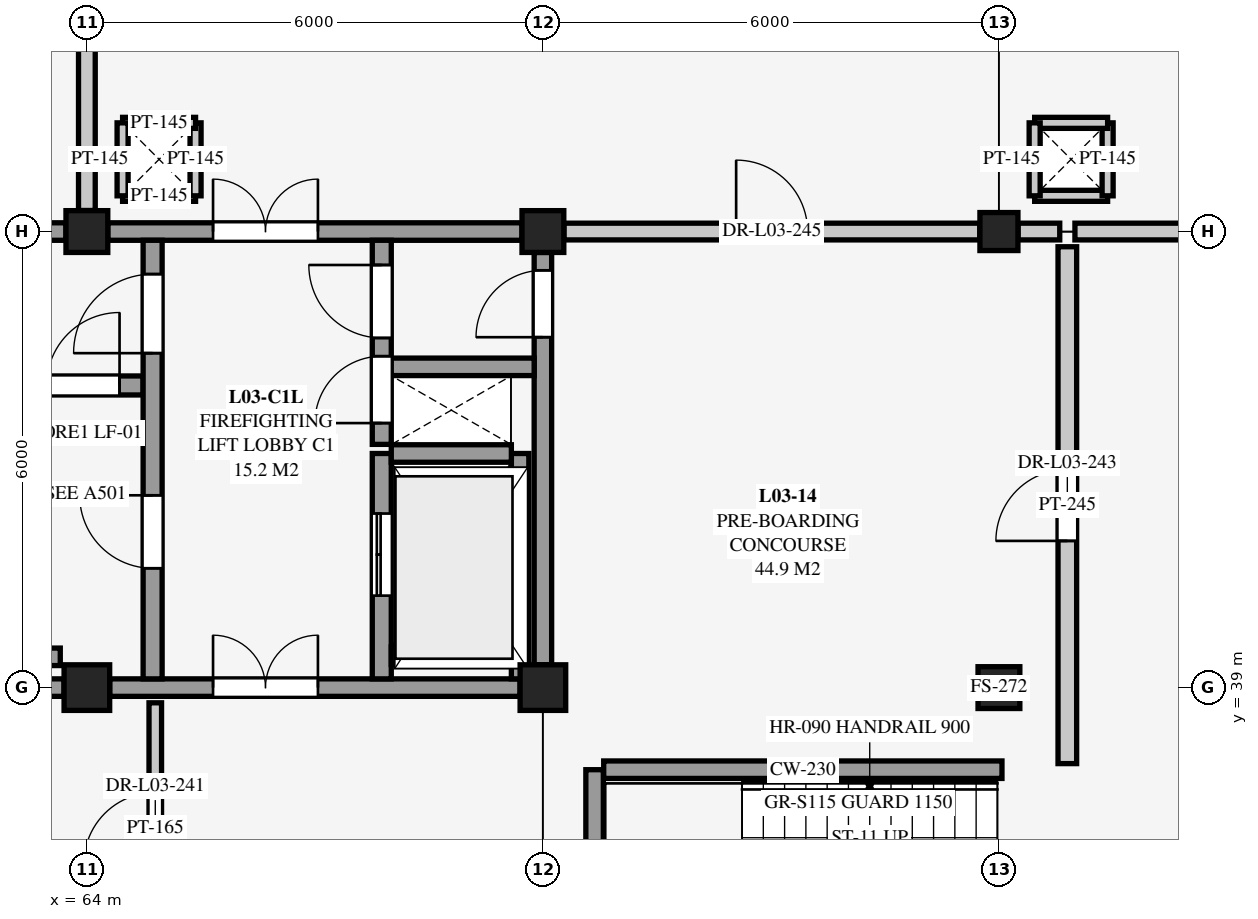
"""IFC4 building model, lengths in metres.
Left out: names, types, materials, properties, quantities, classifications, styles, units other than length and angle.
Written with IfcOpenShell. Run it as: python <this file> out.ifc"""

import sys

from ifc_helpers import new_model, si_unit, direction, frame, frame_2d, origin, origin_2d, place, context, subcontext, project, spatial, rectangle, extrude, element, fill, save


model = new_model("IFC4")
c1 = context("Model", 3, precision=1e-05, world=origin(), true_north=direction((0.0, 1.0)))
c2 = subcontext(c1, "Body", "Model", "MODEL_VIEW")
j1 = project(units=[si_unit("LENGTHUNIT", "METRE"), si_unit("PLANEANGLEUNIT", "RADIAN")], contexts=[c1])
p1 = place(None, origin())
s1 = spatial("IfcSite", under=j1, at=p1, CompositionType="ELEMENT")
p2 = place(p1, origin())
s2 = spatial("IfcBuilding", under=s1, at=p2, CompositionType="ELEMENT")
p3 = place(p2, frame((0.0, 0.0, 9.0)))
s3 = spatial("IfcBuildingStorey", under=s2, at=p3, CompositionType="ELEMENT", Elevation=9.0)
p4 = place(p3, frame((64.0, 39.0, 0.0), z_axis=(0.0, 0.0, 1.0), x_axis=(1.0, 0.0, 0.0)))
e1 = element("IfcColumn", 1, at=p4, inside=s3, PredefinedType="COLUMN", context=c2, shape_type="SweptSolid", body=[
    extrude(rectangle(XDim=0.6, YDim=0.6, at=origin_2d()), origin(), (0.0, 0.0, 1.0), 4.5),
])
p5 = place(p3, frame((64.0, 45.0, 0.0), z_axis=(0.0, 0.0, 1.0), x_axis=(1.0, 0.0, 0.0)))
e2 = element("IfcColumn", 2, at=p5, inside=s3, PredefinedType="COLUMN", context=c2, shape_type="SweptSolid", body=[
    extrude(rectangle(XDim=0.55, YDim=0.55, at=origin_2d()), origin(), (0.0, 0.0, 1.0), 4.5),
])
p6 = place(p3, frame((70.0, 39.0, 0.0), z_axis=(0.0, 0.0, 1.0), x_axis=(1.0, 0.0, 0.0)))
e3 = element("IfcColumn", 3, at=p6, inside=s3, PredefinedType="COLUMN", context=c2, shape_type="SweptSolid", body=[
    extrude(rectangle(XDim=0.6, YDim=0.6, at=origin_2d()), origin(), (0.0, 0.0, 1.0), 4.5),
])
for number, where, z_axis, x_axis in (
    (4, (70.0, 45.0, 0.0), (0.0, 0.0, 1.0), (1.0, 0.0, 0.0)),
    (5, (76.0, 39.0, 0.0), (0.0, 0.0, 1.0), (1.0, 0.0, 0.0)),
):
    element("IfcColumn", number, at=place(p3, frame(where, z_axis=z_axis, x_axis=x_axis)), inside=s3, PredefinedType="COLUMN", context=c2, shape_type="SweptSolid", body=[
        extrude(rectangle(XDim=0.55, YDim=0.55, at=origin_2d()), origin(), (0.0, 0.0, 1.0), 4.5),
    ])
p7 = place(p3, frame((76.0, 45.0, 0.0), z_axis=(0.0, 0.0, 1.0), x_axis=(1.0, 0.0, 0.0)))
e6 = element("IfcColumn", 6, at=p7, inside=s3, PredefinedType="COLUMN", context=c2, shape_type="SweptSolid", body=[
    extrude(rectangle(XDim=0.5, YDim=0.5, at=origin_2d()), origin(), (0.0, 0.0, 1.0), 4.5),
])
for number, where, z_axis, x_axis in (
    (7, (64.47, 45.47, 0.0), (0.0, 0.0, 1.0), (1.0, 0.0, 0.0)),
    (8, (65.43, 45.47, 0.0), (0.0, 0.0, 1.0), (0.0, 1.0, 0.0)),
    (9, (65.43, 46.43, 0.0), (0.0, 0.0, 1.0), (-1.0, 0.0, 0.0)),
    (10, (64.47, 46.43, 0.0), (0.0, 0.0, 1.0), (0.0, -1.0, 0.0)),
    (11, (76.47, 45.47, 0.0), (0.0, 0.0, 1.0), (1.0, 0.0, 0.0)),
    (12, (77.43, 45.47, 0.0), (0.0, 0.0, 1.0), (0.0, 1.0, 0.0)),
    (13, (77.43, 46.43, 0.0), (0.0, 0.0, 1.0), (-1.0, 0.0, 0.0)),
    (14, (76.47, 46.43, 0.0), (0.0, 0.0, 1.0), (0.0, -1.0, 0.0)),
):
    element("IfcWall", number, at=place(p3, frame(where, z_axis=z_axis, x_axis=x_axis)), inside=s3, PredefinedType="PARTITIONING", context=c2, shape_type="SweptSolid", body=[
        extrude(rectangle(XDim=0.96, YDim=0.145, at=frame_2d((0.48, 0.0))), origin(), (0.0, 0.0, 1.0), 4.252),
    ])
p8 = place(p3, frame((58.25, 39.0, 0.0), z_axis=(0.0, 0.0, 1.0), x_axis=(1.0, 0.0, 0.0)))
e15 = element("IfcWall", 15, at=p8, inside=s3, PredefinedType="SHEAR", context=c2, shape_type="SweptSolid", body=[
    extrude(rectangle(XDim=5.45, YDim=0.23, at=frame_2d((2.725, 0.0))), origin(), (0.0, 0.0, 1.0), 4.216),
])
p9 = place(p3, frame((64.3, 39.0, 0.0), z_axis=(0.0, 0.0, 1.0), x_axis=(1.0, 0.0, 0.0)))
e16 = element("IfcWall", 16, at=p9, inside=s3, PredefinedType="SHEAR", context=c2, shape_type="SweptSolid", body=[
    extrude(rectangle(XDim=5.4, YDim=0.23, at=frame_2d((2.7, 0.0))), origin(), (0.0, 0.0, 1.0), 4.216),
])
p10 = place(p9, frame((1.36, 0.0, 0.0)))
e17 = element("IfcOpeningElement", 17, at=p10, cuts=e16, PredefinedType="OPENING", context=c2, shape_type="SweptSolid", body=[
    extrude(rectangle(XDim=1.38, YDim=2.16, at=frame_2d((0.69, 1.08))), frame((0.0, 0.125, 0.0), z_axis=(0.0, -1.0, 0.0), x_axis=(1.0, 0.0, 0.0)), (0.0, 0.0, 1.0), 0.25),
])
p11 = place(p3, frame((58.325, 45.0, 0.0), z_axis=(0.0, 0.0, 1.0), x_axis=(1.0, 0.0, 0.0)))
e18 = element("IfcWall", 18, at=p11, inside=s3, PredefinedType="SHEAR", context=c2, shape_type="SweptSolid", body=[
    extrude(rectangle(XDim=5.4, YDim=0.23, at=frame_2d((2.7, 0.0))), origin(), (0.0, 0.0, 1.0), 4.216),
])
p12 = place(p11, frame((3.605, 0.0, 0.0)))
e19 = element("IfcOpeningElement", 19, at=p12, cuts=e18, PredefinedType="OPENING", context=c2, shape_type="SweptSolid", body=[
    extrude(rectangle(XDim=1.04, YDim=2.14, at=frame_2d((0.52, 1.07))), frame((0.0, 0.125, 0.0), z_axis=(0.0, -1.0, 0.0), x_axis=(1.0, 0.0, 0.0)), (0.0, 0.0, 1.0), 0.25),
])
p13 = place(p3, frame((64.275, 45.0, 0.0), z_axis=(0.0, 0.0, 1.0), x_axis=(1.0, 0.0, 0.0)))
e20 = element("IfcWall", 20, at=p13, inside=s3, PredefinedType="SHEAR", context=c2, shape_type="SweptSolid", body=[
    extrude(rectangle(XDim=5.45, YDim=0.23, at=frame_2d((2.725, 0.0))), origin(), (0.0, 0.0, 1.0), 4.216),
])
p14 = place(p13, frame((1.385, 0.0, 0.0)))
e21 = element("IfcOpeningElement", 21, at=p14, cuts=e20, PredefinedType="OPENING", context=c2, shape_type="SweptSolid", body=[
    extrude(rectangle(XDim=1.38, YDim=2.16, at=frame_2d((0.69, 1.08))), frame((0.0, 0.125, 0.0), z_axis=(0.0, -1.0, 0.0), x_axis=(1.0, 0.0, 0.0)), (0.0, 0.0, 1.0), 0.25),
])
p15 = place(p3, frame((70.0, 39.3, 0.0), z_axis=(0.0, 0.0, 1.0), x_axis=(0.0, 1.0, 0.0)))
e22 = element("IfcWall", 22, at=p15, inside=s3, PredefinedType="SHEAR", context=c2, shape_type="SweptSolid", body=[
    extrude(rectangle(XDim=5.425, YDim=0.23, at=frame_2d((2.712, 0.0))), origin(), (0.0, 0.0, 1.0), 4.216),
])
p16 = place(p15, frame((4.31, 0.0, 0.0)))
e23 = element("IfcOpeningElement", 23, at=p16, cuts=e22, PredefinedType="OPENING", context=c2, shape_type="SweptSolid", body=[
    extrude(rectangle(XDim=0.88, YDim=2.08, at=frame_2d((0.44, 1.04))), frame((0.0, 0.125, 0.0), z_axis=(0.0, -1.0, 0.0), x_axis=(1.0, 0.0, 0.0)), (0.0, 0.0, 1.0), 0.25),
])
p17 = place(p3, frame((58.52, 39.405, 0.0), z_axis=(0.0, 0.0, 1.0), x_axis=(1.0, 0.0, 0.0)))
e24 = element("IfcWall", 24, at=p17, inside=s3, PredefinedType="SHEAR", context=c2, shape_type="SweptSolid", body=[
    extrude(rectangle(XDim=5.13, YDim=0.23, at=frame_2d((2.565, 0.0))), origin(), (0.0, 0.0, 1.0), 4.5),
])
p18 = place(p3, frame((63.16, 42.975, 0.0), z_axis=(0.0, 0.0, 1.0), x_axis=(1.0, 0.0, 0.0)))
e25 = element("IfcWall", 25, at=p18, inside=s3, PredefinedType="SHEAR", context=c2, shape_type="SweptSolid", body=[
    extrude(rectangle(XDim=1.58, YDim=0.25, at=frame_2d((0.79, 0.0))), origin(), (0.0, 0.0, 1.0), 4.216),
])
p19 = place(p18, frame((0.31, 0.0, 0.0)))
e26 = element("IfcOpeningElement", 26, at=p19, cuts=e25, PredefinedType="OPENING", context=c2, shape_type="SweptSolid", body=[
    extrude(rectangle(XDim=0.96, YDim=2.12, at=frame_2d((0.48, 1.06))), frame((0.0, 0.135, 0.0), z_axis=(0.0, -1.0, 0.0), x_axis=(1.0, 0.0, 0.0)), (0.0, 0.0, 1.0), 0.27),
])
p20 = place(p3, frame((64.865, 39.115, 0.0), z_axis=(0.0, 0.0, 1.0), x_axis=(0.0, 1.0, 0.0)))
e27 = element("IfcWall", 27, at=p20, inside=s3, PredefinedType="SHEAR", context=c2, shape_type="SweptSolid", body=[
    extrude(rectangle(XDim=5.77, YDim=0.25, at=frame_2d((2.885, 0.0))), origin(), (0.0, 0.0, 1.0), 4.216),
])
p21 = place(p20, frame((4.285, 0.0, 0.0)))
e28 = element("IfcOpeningElement", 28, at=p21, cuts=e27, PredefinedType="OPENING", context=c2, shape_type="SweptSolid", body=[
    extrude(rectangle(XDim=1.04, YDim=2.14, at=frame_2d((0.52, 1.07))), frame((0.0, 0.135, 0.0), z_axis=(0.0, -1.0, 0.0), x_axis=(1.0, 0.0, 0.0)), (0.0, 0.0, 1.0), 0.27),
])
p22 = place(p20, frame((1.455, 0.0, 0.0)))
e29 = element("IfcOpeningElement", 29, at=p22, cuts=e27, PredefinedType="OPENING", context=c2, shape_type="SweptSolid", body=[
    extrude(rectangle(XDim=0.96, YDim=2.12, at=frame_2d((0.48, 1.06))), frame((0.0, 0.135, 0.0), z_axis=(0.0, -1.0, 0.0), x_axis=(1.0, 0.0, 0.0)), (0.0, 0.0, 1.0), 0.27),
])
p23 = place(p3, frame((67.88, 39.115, 0.0), z_axis=(0.0, 0.0, 1.0), x_axis=(0.0, 1.0, 0.0)))
e30 = element("IfcWall", 30, at=p23, inside=s3, PredefinedType="SHEAR", context=c2, shape_type="SweptSolid", body=[
    extrude(rectangle(XDim=2.965, YDim=0.25, at=frame_2d((1.482, 0.0))), origin(), (0.0, 0.0, 1.0), 4.5),
])
p24 = place(p23, frame((1.095, 0.0, 0.0)))
e31 = element("IfcOpeningElement", 31, at=p24, cuts=e30, PredefinedType="OPENING", context=c2, shape_type="SweptSolid", body=[
    extrude(rectangle(XDim=1.08, YDim=2.15, at=frame_2d((0.54, 1.075))), frame((0.0, 0.135, 0.0), z_axis=(0.0, -1.0, 0.0), x_axis=(1.0, 0.0, 0.0)), (0.0, 0.0, 1.0), 0.27),
])
p25 = place(p3, frame((68.005, 39.42, 0.0), z_axis=(0.0, 0.0, 1.0), x_axis=(1.0, 0.0, 0.0)))
e32 = element("IfcWall", 32, at=p25, inside=s3, PredefinedType="SHEAR", context=c2, shape_type="SweptSolid", body=[
    extrude(rectangle(XDim=1.58, YDim=0.23, at=frame_2d((0.79, 0.0))), origin(), (0.0, 0.0, 1.0), 4.5),
])
p26 = place(p3, frame((69.7, 39.115, 0.0), z_axis=(0.0, 0.0, 1.0), x_axis=(0.0, 1.0, 0.0)))
e33 = element("IfcWall", 33, at=p26, inside=s3, PredefinedType="SHEAR", context=c2, shape_type="SweptSolid", body=[
    extrude(rectangle(XDim=2.965, YDim=0.23, at=frame_2d((1.482, 0.0))), origin(), (0.0, 0.0, 1.0), 4.5),
])
p27 = place(p3, frame((68.005, 42.08, 0.0), z_axis=(0.0, 0.0, 1.0), x_axis=(1.0, 0.0, 0.0)))
e34 = element("IfcWall", 34, at=p27, inside=s3, PredefinedType="SHEAR", context=c2, shape_type="SweptSolid", body=[
    extrude(rectangle(XDim=1.58, YDim=0.23, at=frame_2d((0.79, 0.0))), origin(), (0.0, 0.0, 1.0), 4.5),
])
p28 = place(p3, frame((67.88, 42.2, 0.0), z_axis=(0.0, 0.0, 1.0), x_axis=(0.0, 1.0, 0.0)))
e35 = element("IfcWall", 35, at=p28, inside=s3, PredefinedType="SHEAR", context=c2, shape_type="SweptSolid", body=[
    extrude(rectangle(XDim=2.685, YDim=0.25, at=frame_2d((1.343, 0.0))), origin(), (0.0, 0.0, 1.0), 4.216),
])
p29 = place(p28, frame((0.28, 0.0, 0.0)))
e36 = element("IfcOpeningElement", 36, at=p29, cuts=e35, PredefinedType="OPENING", context=c2, shape_type="SweptSolid", body=[
    extrude(rectangle(XDim=0.88, YDim=2.08, at=frame_2d((0.44, 1.04))), frame((0.0, 0.135, 0.0), z_axis=(0.0, -1.0, 0.0), x_axis=(1.0, 0.0, 0.0)), (0.0, 0.0, 1.0), 0.27),
])
p30 = place(p28, frame((1.4, 0.0, 0.0)))
e37 = element("IfcOpeningElement", 37, at=p30, cuts=e35, PredefinedType="OPENING", context=c2, shape_type="SweptSolid", body=[
    extrude(rectangle(XDim=0.96, YDim=2.12, at=frame_2d((0.48, 1.06))), frame((0.0, 0.135, 0.0), z_axis=(0.0, -1.0, 0.0), x_axis=(1.0, 0.0, 0.0)), (0.0, 0.0, 1.0), 0.27),
])
p31 = place(p3, frame((68.005, 43.22, 0.0), z_axis=(0.0, 0.0, 1.0), x_axis=(1.0, 0.0, 0.0)))
e38 = element("IfcWall", 38, at=p31, inside=s3, PredefinedType="SHEAR", context=c2, shape_type="SweptSolid", body=[
    extrude(rectangle(XDim=1.88, YDim=0.23, at=frame_2d((0.94, 0.0))), origin(), (0.0, 0.0, 1.0), 4.216),
])
p32 = place(p3, frame((70.68, 34.08, 0.0), z_axis=(0.0, 0.0, 1.0), x_axis=(0.0, 1.0, 0.0)))
e39 = element("IfcWall", 39, at=p32, inside=s3, PredefinedType="SHEAR", context=c2, shape_type="SweptSolid", body=[
    extrude(rectangle(XDim=3.84, YDim=0.23, at=frame_2d((1.92, 0.0))), origin(), (0.0, 0.0, 1.0), 4.216),
])
p33 = place(p3, frame((70.8, 37.92, 0.0), z_axis=(0.0, 0.0, 1.0), x_axis=(1.0, 0.0, 0.0)))
e40 = element("IfcWall", 40, at=p33, inside=s3, PredefinedType="SHEAR", context=c2, shape_type="SweptSolid", body=[
    extrude(rectangle(XDim=5.24, YDim=0.23, at=frame_2d((2.62, 0.0))), origin(), (0.0, 0.0, 1.0), 4.216),
])
p34 = place(p3, frame((64.9, 35.5, 0.0), z_axis=(0.0, 0.0, 1.0), x_axis=(0.0, 1.0, 0.0)))
e41 = element("IfcWall", 41, at=p34, inside=s3, PredefinedType="PARTITIONING", context=c2, shape_type="SweptSolid", body=[
    extrude(rectangle(XDim=3.3, YDim=0.165, at=frame_2d((1.65, 0.0))), origin(), (0.0, 0.0, 1.0), 4.24),
])
p35 = place(p34, frame((1.18, 0.0, 0.0)))
e42 = element("IfcOpeningElement", 42, at=p35, cuts=e41, PredefinedType="OPENING", context=c2, shape_type="SweptSolid", body=[
    extrude(rectangle(XDim=0.94, YDim=2.1, at=frame_2d((0.47, 1.05))), frame((0.0, 0.093, 0.0), z_axis=(0.0, -1.0, 0.0), x_axis=(1.0, 0.0, 0.0)), (0.0, 0.0, 1.0), 0.185),
])
p36 = place(p3, frame((76.9, 38.0, 0.0), z_axis=(0.0, 0.0, 1.0), x_axis=(0.0, 1.0, 0.0)))
e43 = element("IfcWall", 43, at=p36, inside=s3, PredefinedType="PARTITIONING", context=c2, shape_type="SweptSolid", body=[
    extrude(rectangle(XDim=6.8, YDim=0.245, at=frame_2d((3.4, 0.0))), origin(), (0.0, 0.0, 1.0), 4.216),
])
p37 = place(p36, frame((2.93, 0.0, 0.0)))
e44 = element("IfcOpeningElement", 44, at=p37, cuts=e43, PredefinedType="OPENING", context=c2, shape_type="SweptSolid", body=[
    extrude(rectangle(XDim=0.94, YDim=2.1, at=frame_2d((0.47, 1.05))), frame((0.0, 0.133, 0.0), z_axis=(0.0, -1.0, 0.0), x_axis=(1.0, 0.0, 0.0)), (0.0, 0.0, 1.0), 0.265),
])
p38 = place(p3, frame((77.0, 45.0, 0.0), z_axis=(0.0, 0.0, 1.0), x_axis=(1.0, 0.0, 0.0)))
e45 = element("IfcWall", 45, at=p38, inside=s3, PredefinedType="SOLIDWALL", context=c2, shape_type="SweptSolid", body=[
    extrude(rectangle(XDim=4.698, YDim=0.22, at=frame_2d((2.349, 0.0))), origin(), (0.0, 0.0, 1.0), 3.753),
])
p39 = place(p38, frame((1.879, 0.0, 0.0)))
e46 = element("IfcOpeningElement", 46, at=p39, cuts=e45, PredefinedType="OPENING", context=c2, shape_type="SweptSolid", body=[
    extrude(rectangle(XDim=0.94, YDim=2.1, at=frame_2d((0.47, 1.05))), frame((0.0, 0.12, 0.0), z_axis=(0.0, -1.0, 0.0), x_axis=(1.0, 0.0, 0.0)), (0.0, 0.0, 1.0), 0.24),
])
p40 = place(p3, frame((70.277, 45.0, 0.0), z_axis=(0.0, 0.0, 1.0), x_axis=(1.0, 0.0, 0.0)))
e47 = element("IfcWall", 47, at=p40, inside=s3, PredefinedType="SOLIDWALL", context=c2, shape_type="SweptSolid", body=[
    extrude(rectangle(XDim=5.471, YDim=0.22, at=frame_2d((2.735, 0.0))), origin(), (0.0, 0.0, 1.0), 3.803),
])
p41 = place(p40, frame((2.265, 0.0, 0.0)))
e48 = element("IfcOpeningElement", 48, at=p41, cuts=e47, PredefinedType="OPENING", context=c2, shape_type="SweptSolid", body=[
    extrude(rectangle(XDim=0.94, YDim=2.1, at=frame_2d((0.47, 1.05))), frame((0.0, 0.12, 0.0), z_axis=(0.0, -1.0, 0.0), x_axis=(1.0, 0.0, 0.0)), (0.0, 0.0, 1.0), 0.24),
])
p42 = place(p3, frame((76.252, 45.0, 0.0), z_axis=(0.0, 0.0, 1.0), x_axis=(1.0, 0.0, 0.0)))
e49 = element("IfcWall", 49, at=p42, inside=s3, PredefinedType="SOLIDWALL", context=c2, shape_type="SweptSolid", body=[
    extrude(rectangle(XDim=0.548, YDim=0.22, at=frame_2d((0.274, 0.0))), origin(), (0.0, 0.0, 1.0), 3.753),
])
p43 = place(p3, frame((64.0, 45.277, 0.0), z_axis=(0.0, 0.0, 1.0), x_axis=(0.0, 1.0, 0.0)))
e50 = element("IfcWall", 50, at=p43, inside=s3, PredefinedType="SOLIDWALL", context=c2, shape_type="SweptSolid", body=[
    extrude(rectangle(XDim=5.471, YDim=0.22, at=frame_2d((2.735, 0.0))), origin(), (0.0, 0.0, 1.0), 3.759),
])
p44 = place(p43, frame((2.265, 0.0, 0.0)))
e51 = element("IfcOpeningElement", 51, at=p44, cuts=e50, PredefinedType="OPENING", context=c2, shape_type="SweptSolid", body=[
    extrude(rectangle(XDim=0.94, YDim=2.1, at=frame_2d((0.47, 1.05))), frame((0.0, 0.12, 0.0), z_axis=(0.0, -1.0, 0.0), x_axis=(1.0, 0.0, 0.0)), (0.0, 0.0, 1.0), 0.24),
])
p45 = place(p10, origin())
e52 = element("IfcDoor", 52, at=p45, inside=s3, OperationType="DOUBLE_DOOR_SINGLE_SWING", PredefinedType="DOOR", context=c2, shape_type="SweptSolid", body=[
    extrude(rectangle(XDim=1.38, YDim=2.16, at=frame_2d((0.69, 1.08))), frame((0.0, 0.025, 0.0), z_axis=(0.0, -1.0, 0.0), x_axis=(1.0, 0.0, 0.0)), (0.0, 0.0, 1.0), 0.05),
])
fill(e17, e52)
p46 = place(p14, origin())
e53 = element("IfcDoor", 53, at=p46, inside=s3, OperationType="DOUBLE_DOOR_SINGLE_SWING", PredefinedType="DOOR", context=c2, shape_type="SweptSolid", body=[
    extrude(rectangle(XDim=1.38, YDim=2.16, at=frame_2d((0.69, 1.08))), frame((0.0, 0.025, 0.0), z_axis=(0.0, -1.0, 0.0), x_axis=(1.0, 0.0, 0.0)), (0.0, 0.0, 1.0), 0.05),
])
fill(e21, e53)
p47 = place(p16, origin())
e54 = element("IfcDoor", 54, at=p47, inside=s3, OperationType="SINGLE_SWING_LEFT", PredefinedType="DOOR", context=c2, shape_type="SweptSolid", body=[
    extrude(rectangle(XDim=0.88, YDim=2.08, at=frame_2d((0.44, 1.04))), frame((0.0, 0.025, 0.0), z_axis=(0.0, -1.0, 0.0), x_axis=(1.0, 0.0, 0.0)), (0.0, 0.0, 1.0), 0.05),
])
fill(e23, e54)
p48 = place(p19, origin())
e55 = element("IfcDoor", 55, at=p48, inside=s3, OperationType="SINGLE_SWING_RIGHT", PredefinedType="DOOR", context=c2, shape_type="SweptSolid", body=[
    extrude(rectangle(XDim=0.96, YDim=2.12, at=frame_2d((0.48, 1.06))), frame((0.0, 0.025, 0.0), z_axis=(0.0, -1.0, 0.0), x_axis=(1.0, 0.0, 0.0)), (0.0, 0.0, 1.0), 0.05),
])
fill(e26, e55)
p49 = place(p21, origin())
e56 = element("IfcDoor", 56, at=p49, inside=s3, OperationType="SINGLE_SWING_LEFT", PredefinedType="DOOR", context=c2, shape_type="SweptSolid", body=[
    extrude(rectangle(XDim=1.04, YDim=2.14, at=frame_2d((0.52, 1.07))), frame((0.0, 0.025, 0.0), z_axis=(0.0, -1.0, 0.0), x_axis=(1.0, 0.0, 0.0)), (0.0, 0.0, 1.0), 0.05),
])
fill(e28, e56)
p50 = place(p22, origin())
e57 = element("IfcDoor", 57, at=p50, inside=s3, OperationType="SINGLE_SWING_RIGHT", PredefinedType="DOOR", context=c2, shape_type="SweptSolid", body=[
    extrude(rectangle(XDim=0.96, YDim=2.12, at=frame_2d((0.48, 1.06))), frame((0.0, 0.025, 0.0), z_axis=(0.0, -1.0, 0.0), x_axis=(1.0, 0.0, 0.0)), (0.0, 0.0, 1.0), 0.05),
])
fill(e29, e57)
p51 = place(p24, origin())
e58 = element("IfcDoor", 58, at=p51, inside=s3, OperationType="DOUBLE_DOOR_SLIDING", PredefinedType="DOOR", context=c2, shape_type="SweptSolid", body=[
    extrude(rectangle(XDim=1.08, YDim=2.15, at=frame_2d((0.54, 1.075))), frame((0.0, 0.025, 0.0), z_axis=(0.0, -1.0, 0.0), x_axis=(1.0, 0.0, 0.0)), (0.0, 0.0, 1.0), 0.05),
])
fill(e31, e58)
p52 = place(p29, origin())
e59 = element("IfcDoor", 59, at=p52, inside=s3, OperationType="SINGLE_SWING_LEFT", PredefinedType="DOOR", context=c2, shape_type="SweptSolid", body=[
    extrude(rectangle(XDim=0.88, YDim=2.08, at=frame_2d((0.44, 1.04))), frame((0.0, 0.025, 0.0), z_axis=(0.0, -1.0, 0.0), x_axis=(1.0, 0.0, 0.0)), (0.0, 0.0, 1.0), 0.05),
])
fill(e36, e59)
p53 = place(p30, origin())
e60 = element("IfcDoor", 60, at=p53, inside=s3, OperationType="SINGLE_SWING_RIGHT", PredefinedType="DOOR", context=c2, shape_type="SweptSolid", body=[
    extrude(rectangle(XDim=0.96, YDim=2.12, at=frame_2d((0.48, 1.06))), frame((0.0, 0.025, 0.0), z_axis=(0.0, -1.0, 0.0), x_axis=(1.0, 0.0, 0.0)), (0.0, 0.0, 1.0), 0.05),
])
fill(e37, e60)
p54 = place(p35, origin())
e61 = element("IfcDoor", 61, at=p54, inside=s3, OperationType="SINGLE_SWING_LEFT", PredefinedType="DOOR", context=c2, shape_type="SweptSolid", body=[
    extrude(rectangle(XDim=0.94, YDim=2.1, at=frame_2d((0.47, 1.05))), frame((0.0, 0.025, 0.0), z_axis=(0.0, -1.0, 0.0), x_axis=(1.0, 0.0, 0.0)), (0.0, 0.0, 1.0), 0.05),
])
fill(e42, e61)
p55 = place(p37, origin())
e62 = element("IfcDoor", 62, at=p55, inside=s3, OperationType="SINGLE_SWING_LEFT", PredefinedType="DOOR", context=c2, shape_type="SweptSolid", body=[
    extrude(rectangle(XDim=0.94, YDim=2.1, at=frame_2d((0.47, 1.05))), frame((0.0, 0.025, 0.0), z_axis=(0.0, -1.0, 0.0), x_axis=(1.0, 0.0, 0.0)), (0.0, 0.0, 1.0), 0.05),
])
fill(e44, e62)
p56 = place(p41, origin())
e63 = element("IfcDoor", 63, at=p56, inside=s3, OperationType="SINGLE_SWING_LEFT", PredefinedType="DOOR", context=c2, shape_type="SweptSolid", body=[
    extrude(rectangle(XDim=0.94, YDim=2.1, at=frame_2d((0.47, 1.05))), frame((0.0, 0.025, 0.0), z_axis=(0.0, -1.0, 0.0), x_axis=(1.0, 0.0, 0.0)), (0.0, 0.0, 1.0), 0.05),
])
fill(e48, e63)
save(model, sys.argv[1])
